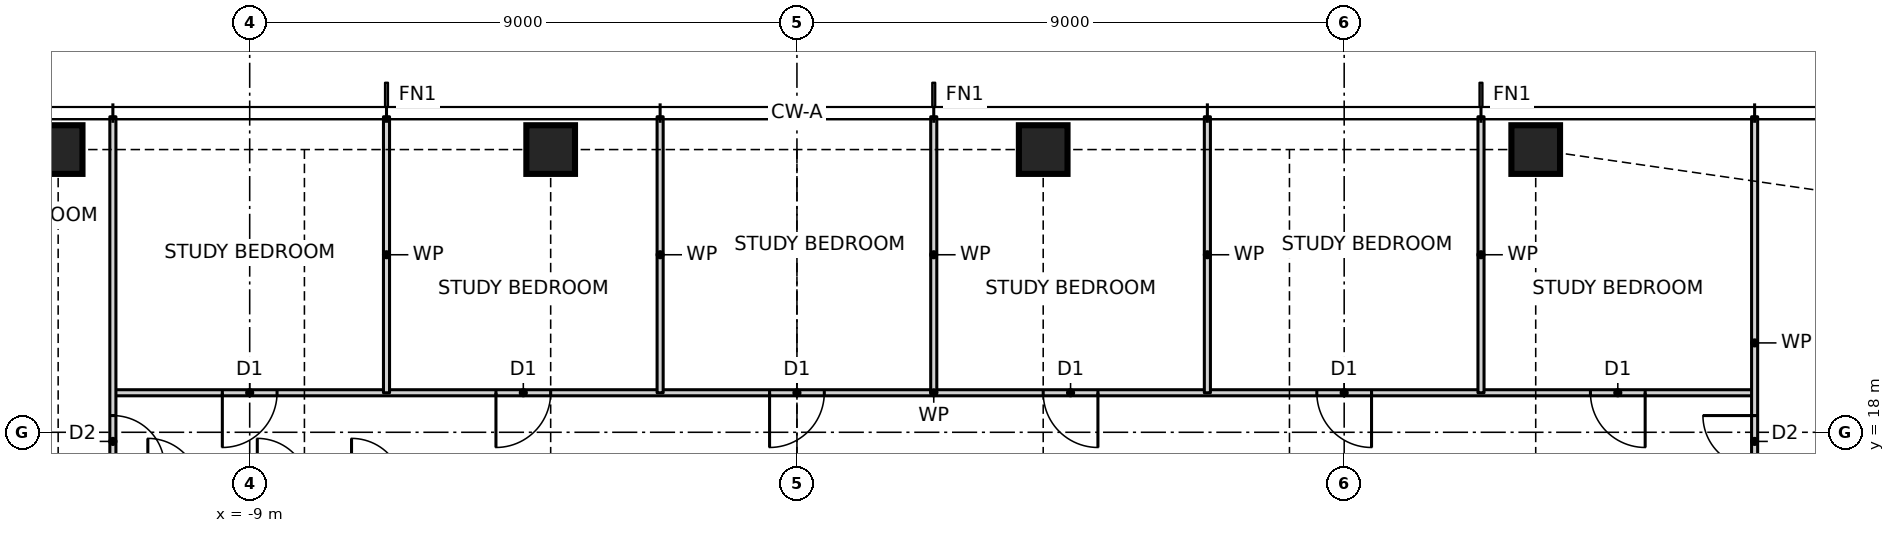
"""IFC4 building model, lengths in metres.
Left out: names, types, materials, properties, quantities, classifications, styles, units other than length and angle.
Written with IfcOpenShell. Run it as: python <this file> out.ifc"""

import sys

from ifc_helpers import new_model, si_unit, direction, frame, frame_2d, origin, origin_2d, place, context, subcontext, project, spatial, rectangle, hollow_rectangle, extrude, element, fill, save


model = new_model("IFC4")
c1 = context("Model", 3, precision=1e-05, world=origin(), true_north=direction((0.0, 1.0)))
c2 = subcontext(c1, "Body", "Model", "MODEL_VIEW")
j1 = project(units=[si_unit("LENGTHUNIT", "METRE"), si_unit("PLANEANGLEUNIT", "RADIAN")], contexts=[c1])
p1 = place(None, origin())
s1 = spatial("IfcSite", under=j1, at=p1, CompositionType="ELEMENT")
p2 = place(p1, origin())
s2 = spatial("IfcBuilding", under=s1, at=p2, CompositionType="ELEMENT")
p3 = place(p2, frame((0.0, 0.0, 67.5)))
s3 = spatial("IfcBuildingStorey", under=s2, at=p3, CompositionType="ELEMENT", Elevation=67.5)
for number, where, z_axis, x_axis in (
    (1, (12.15, 22.65, 0.0), (0.0, 0.0, 1.0), (1.0, 0.0, 0.0)),
    (2, (4.05, 22.65, 0.0), (0.0, 0.0, 1.0), (1.0, 0.0, 0.0)),
    (3, (-4.05, 22.65, 0.0), (0.0, 0.0, 1.0), (1.0, 0.0, 0.0)),
    (4, (-12.15, 22.65, 0.0), (0.0, 0.0, 1.0), (1.0, 0.0, 0.0)),
):
    element("IfcColumn", number, at=place(p3, frame(where, z_axis=z_axis, x_axis=x_axis)), inside=s3, PredefinedType="COLUMN", context=c2, shape_type="SweptSolid", body=[
        extrude(hollow_rectangle(XDim=0.8, YDim=0.8, WallThickness=0.09, at=origin_2d()), origin(), (0.0, 0.0, 1.0), 3.5),
    ])
p4 = place(p3, frame((-11.25, 18.65, 0.0), z_axis=(0.0, 0.0, 1.0), x_axis=(1.0, 0.0, 0.0)))
e5 = element("IfcWall", 5, at=p4, inside=s3, PredefinedType="PARTITIONING", context=c2, shape_type="SweptSolid", body=[
    extrude(rectangle(XDim=27.0, YDim=0.1, at=frame_2d((13.5, 0.0))), origin(), (0.0, 0.0, 1.0), 3.27),
])
p5 = place(p4, frame((24.3, 0.0, 0.0)))
e6 = element("IfcOpeningElement", 6, at=p5, cuts=e5, PredefinedType="OPENING", context=c2, shape_type="SweptSolid", body=[
    extrude(rectangle(XDim=0.9, YDim=2.1, at=frame_2d((0.45, 1.05))), frame((0.0, 0.06, 0.0), z_axis=(0.0, -1.0, 0.0), x_axis=(1.0, 0.0, 0.0)), (0.0, 0.0, 1.0), 0.12),
])
p6 = place(p4, frame((19.8, 0.0, 0.0)))
e7 = element("IfcOpeningElement", 7, at=p6, cuts=e5, PredefinedType="OPENING", context=c2, shape_type="SweptSolid", body=[
    extrude(rectangle(XDim=0.9, YDim=2.1, at=frame_2d((0.45, 1.05))), frame((0.0, 0.06, 0.0), z_axis=(0.0, -1.0, 0.0), x_axis=(1.0, 0.0, 0.0)), (0.0, 0.0, 1.0), 0.12),
])
p7 = place(p4, frame((15.3, 0.0, 0.0)))
e8 = element("IfcOpeningElement", 8, at=p7, cuts=e5, PredefinedType="OPENING", context=c2, shape_type="SweptSolid", body=[
    extrude(rectangle(XDim=0.9, YDim=2.1, at=frame_2d((0.45, 1.05))), frame((0.0, 0.06, 0.0), z_axis=(0.0, -1.0, 0.0), x_axis=(1.0, 0.0, 0.0)), (0.0, 0.0, 1.0), 0.12),
])
p8 = place(p4, frame((10.8, 0.0, 0.0)))
e9 = element("IfcOpeningElement", 9, at=p8, cuts=e5, PredefinedType="OPENING", context=c2, shape_type="SweptSolid", body=[
    extrude(rectangle(XDim=0.9, YDim=2.1, at=frame_2d((0.45, 1.05))), frame((0.0, 0.06, 0.0), z_axis=(0.0, -1.0, 0.0), x_axis=(1.0, 0.0, 0.0)), (0.0, 0.0, 1.0), 0.12),
])
p9 = place(p4, frame((6.3, 0.0, 0.0)))
e10 = element("IfcOpeningElement", 10, at=p9, cuts=e5, PredefinedType="OPENING", context=c2, shape_type="SweptSolid", body=[
    extrude(rectangle(XDim=0.9, YDim=2.1, at=frame_2d((0.45, 1.05))), frame((0.0, 0.06, 0.0), z_axis=(0.0, -1.0, 0.0), x_axis=(1.0, 0.0, 0.0)), (0.0, 0.0, 1.0), 0.12),
])
p10 = place(p4, frame((1.8, 0.0, 0.0)))
e11 = element("IfcOpeningElement", 11, at=p10, cuts=e5, PredefinedType="OPENING", context=c2, shape_type="SweptSolid", body=[
    extrude(rectangle(XDim=0.9, YDim=2.1, at=frame_2d((0.45, 1.05))), frame((0.0, 0.06, 0.0), z_axis=(0.0, -1.0, 0.0), x_axis=(1.0, 0.0, 0.0)), (0.0, 0.0, 1.0), 0.12),
])
p11 = place(p3, frame((15.75, 15.75, 0.0), z_axis=(0.0, 0.0, 1.0), x_axis=(0.0, 1.0, 0.0)))
e12 = element("IfcWall", 12, at=p11, inside=s3, PredefinedType="PARTITIONING", context=c2, shape_type="SweptSolid", body=[
    extrude(rectangle(XDim=7.44, YDim=0.1, at=frame_2d((3.72, 0.0))), origin(), (0.0, 0.0, 1.0), 3.27),
])
p12 = place(p11, frame((1.675, 0.0, 0.0)))
e13 = element("IfcOpeningElement", 13, at=p12, cuts=e12, PredefinedType="OPENING", context=c2, shape_type="SweptSolid", body=[
    extrude(rectangle(XDim=0.85, YDim=2.1, at=frame_2d((0.425, 1.05))), frame((0.0, 0.06, 0.0), z_axis=(0.0, -1.0, 0.0), x_axis=(1.0, 0.0, 0.0)), (0.0, 0.0, 1.0), 0.12),
])
for number, where, z_axis, x_axis in (
    (14, (11.25, 18.65, 0.0), (0.0, 0.0, 1.0), (0.0, 1.0, 0.0)),
    (15, (6.75, 18.65, 0.0), (0.0, 0.0, 1.0), (0.0, 1.0, 0.0)),
    (16, (2.25, 18.65, 0.0), (0.0, 0.0, 1.0), (0.0, 1.0, 0.0)),
    (17, (-2.25, 18.65, 0.0), (0.0, 0.0, 1.0), (0.0, 1.0, 0.0)),
    (18, (-6.75, 18.65, 0.0), (0.0, 0.0, 1.0), (0.0, 1.0, 0.0)),
):
    element("IfcWall", number, at=place(p3, frame(where, z_axis=z_axis, x_axis=x_axis)), inside=s3, PredefinedType="PARTITIONING", context=c2, shape_type="SweptSolid", body=[
        extrude(rectangle(XDim=4.54, YDim=0.1, at=frame_2d((2.27, 0.0))), origin(), (0.0, 0.0, 1.0), 3.27),
    ])
p13 = place(p3, frame((-11.25, 11.6, 0.0), z_axis=(0.0, 0.0, 1.0), x_axis=(0.0, 1.0, 0.0)))
e19 = element("IfcWall", 19, at=p13, inside=s3, PredefinedType="PARTITIONING", context=c2, shape_type="SweptSolid", body=[
    extrude(rectangle(XDim=11.59, YDim=0.1, at=frame_2d((5.795, 0.0))), origin(), (0.0, 0.0, 1.0), 3.27),
])
p14 = place(p13, frame((5.825, 0.0, 0.0)))
e20 = element("IfcOpeningElement", 20, at=p14, cuts=e19, PredefinedType="OPENING", context=c2, shape_type="SweptSolid", body=[
    extrude(rectangle(XDim=0.85, YDim=2.1, at=frame_2d((0.425, 1.05))), frame((0.0, 0.06, 0.0), z_axis=(0.0, -1.0, 0.0), x_axis=(1.0, 0.0, 0.0)), (0.0, 0.0, 1.0), 0.12),
])
p15 = place(p5, frame((0.9, 0.0, 0.0), z_axis=(0.0, 0.0, 1.0), x_axis=(-1.0, 0.0, 0.0)))
e21 = element("IfcDoor", 21, at=p15, inside=s3, OperationType="SINGLE_SWING_LEFT", PredefinedType="DOOR", context=c2, shape_type="SweptSolid", body=[
    extrude(rectangle(XDim=0.9, YDim=2.1, at=frame_2d((0.45, 1.05))), frame((0.0, 0.025, 0.0), z_axis=(0.0, -1.0, 0.0), x_axis=(1.0, 0.0, 0.0)), (0.0, 0.0, 1.0), 0.05),
])
fill(e6, e21)
p16 = place(p6, frame((0.9, 0.0, 0.0), z_axis=(0.0, 0.0, 1.0), x_axis=(-1.0, 0.0, 0.0)))
e22 = element("IfcDoor", 22, at=p16, inside=s3, OperationType="SINGLE_SWING_LEFT", PredefinedType="DOOR", context=c2, shape_type="SweptSolid", body=[
    extrude(rectangle(XDim=0.9, YDim=2.1, at=frame_2d((0.45, 1.05))), frame((0.0, 0.025, 0.0), z_axis=(0.0, -1.0, 0.0), x_axis=(1.0, 0.0, 0.0)), (0.0, 0.0, 1.0), 0.05),
])
fill(e7, e22)
p17 = place(p7, frame((0.9, 0.0, 0.0), z_axis=(0.0, 0.0, 1.0), x_axis=(-1.0, 0.0, 0.0)))
e23 = element("IfcDoor", 23, at=p17, inside=s3, OperationType="SINGLE_SWING_LEFT", PredefinedType="DOOR", context=c2, shape_type="SweptSolid", body=[
    extrude(rectangle(XDim=0.9, YDim=2.1, at=frame_2d((0.45, 1.05))), frame((0.0, 0.025, 0.0), z_axis=(0.0, -1.0, 0.0), x_axis=(1.0, 0.0, 0.0)), (0.0, 0.0, 1.0), 0.05),
])
fill(e8, e23)
p18 = place(p8, frame((0.9, 0.0, 0.0), z_axis=(0.0, 0.0, 1.0), x_axis=(-1.0, 0.0, 0.0)))
e24 = element("IfcDoor", 24, at=p18, inside=s3, OperationType="SINGLE_SWING_RIGHT", PredefinedType="DOOR", context=c2, shape_type="SweptSolid", body=[
    extrude(rectangle(XDim=0.9, YDim=2.1, at=frame_2d((0.45, 1.05))), frame((0.0, 0.025, 0.0), z_axis=(0.0, -1.0, 0.0), x_axis=(1.0, 0.0, 0.0)), (0.0, 0.0, 1.0), 0.05),
])
fill(e9, e24)
p19 = place(p9, frame((0.9, 0.0, 0.0), z_axis=(0.0, 0.0, 1.0), x_axis=(-1.0, 0.0, 0.0)))
e25 = element("IfcDoor", 25, at=p19, inside=s3, OperationType="SINGLE_SWING_RIGHT", PredefinedType="DOOR", context=c2, shape_type="SweptSolid", body=[
    extrude(rectangle(XDim=0.9, YDim=2.1, at=frame_2d((0.45, 1.05))), frame((0.0, 0.025, 0.0), z_axis=(0.0, -1.0, 0.0), x_axis=(1.0, 0.0, 0.0)), (0.0, 0.0, 1.0), 0.05),
])
fill(e10, e25)
p20 = place(p10, frame((0.9, 0.0, 0.0), z_axis=(0.0, 0.0, 1.0), x_axis=(-1.0, 0.0, 0.0)))
e26 = element("IfcDoor", 26, at=p20, inside=s3, OperationType="SINGLE_SWING_RIGHT", PredefinedType="DOOR", context=c2, shape_type="SweptSolid", body=[
    extrude(rectangle(XDim=0.9, YDim=2.1, at=frame_2d((0.45, 1.05))), frame((0.0, 0.025, 0.0), z_axis=(0.0, -1.0, 0.0), x_axis=(1.0, 0.0, 0.0)), (0.0, 0.0, 1.0), 0.05),
])
fill(e11, e26)
p21 = place(p14, frame((0.85, 0.0, 0.0), z_axis=(0.0, 0.0, 1.0), x_axis=(-1.0, 0.0, 0.0)))
e27 = element("IfcDoor", 27, at=p21, inside=s3, OperationType="SINGLE_SWING_RIGHT", PredefinedType="DOOR", context=c2, shape_type="SweptSolid", body=[
    extrude(rectangle(XDim=0.85, YDim=2.1, at=frame_2d((0.425, 1.05))), frame((0.0, 0.025, 0.0), z_axis=(0.0, -1.0, 0.0), x_axis=(1.0, 0.0, 0.0)), (0.0, 0.0, 1.0), 0.05),
])
fill(e20, e27)
p22 = place(p12, origin())
e28 = element("IfcDoor", 28, at=p22, inside=s3, OperationType="SINGLE_SWING_RIGHT", PredefinedType="DOOR", context=c2, shape_type="SweptSolid", body=[
    extrude(rectangle(XDim=0.85, YDim=2.1, at=frame_2d((0.425, 1.05))), frame((0.0, 0.025, 0.0), z_axis=(0.0, -1.0, 0.0), x_axis=(1.0, 0.0, 0.0)), (0.0, 0.0, 1.0), 0.05),
])
fill(e13, e28)
save(model, sys.argv[1])
